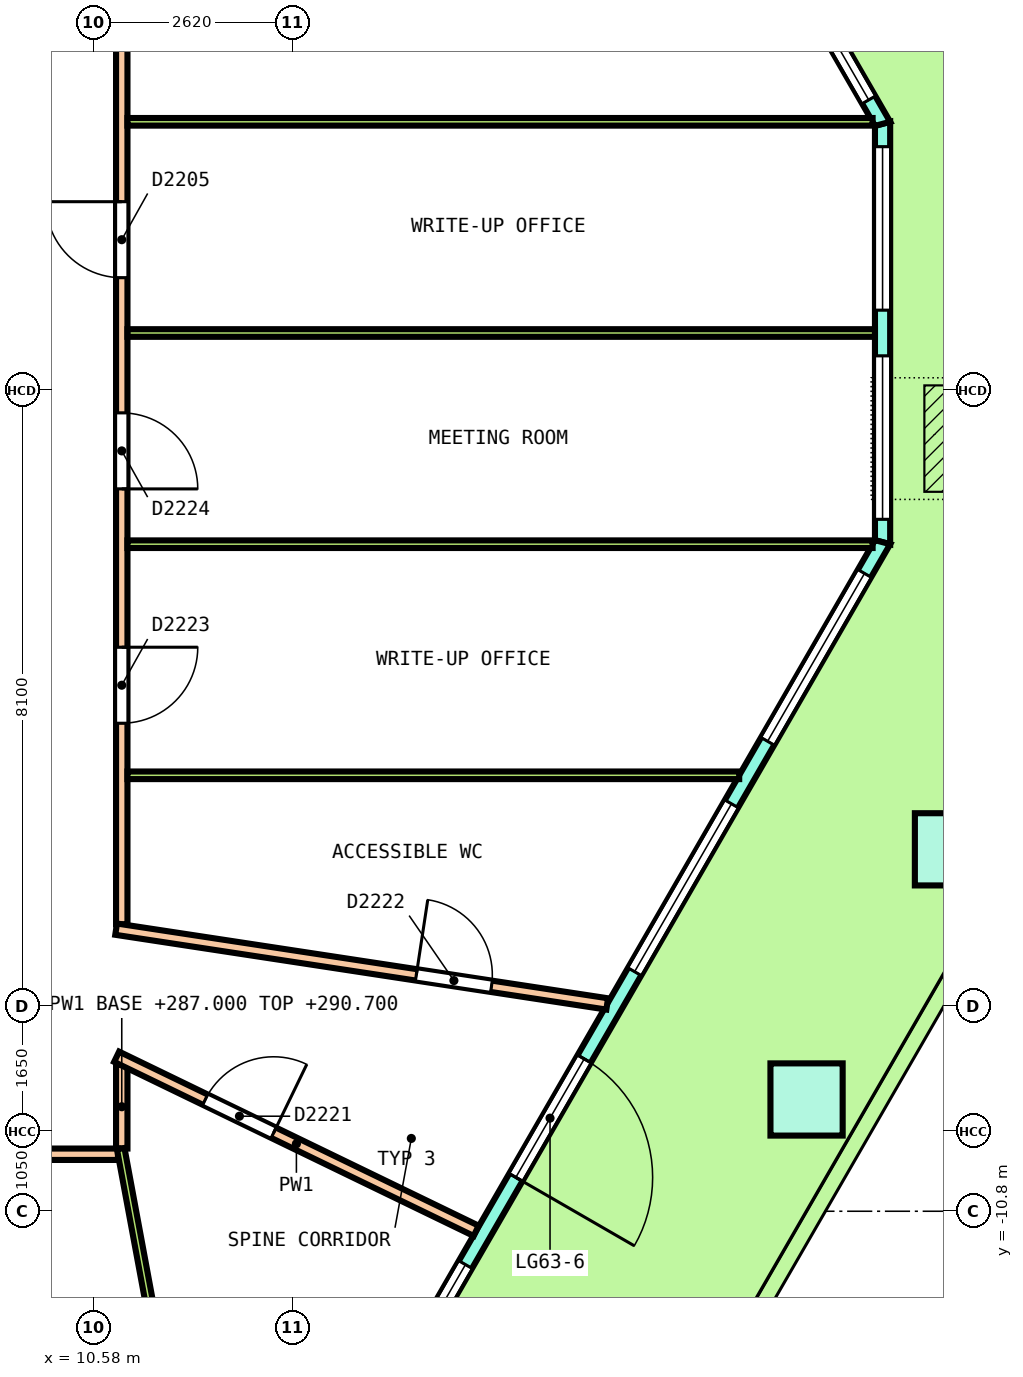
"""IFC4 building model, lengths in metres.
Left out: names, types, materials, properties, quantities, classifications, styles, units other than length and angle.
Written with IfcOpenShell. Run it as: python <this file> out.ifc"""

import sys

from ifc_helpers import new_model, si_unit, direction, frame, frame_2d, origin, origin_2d, place, context, subcontext, project, spatial, polyline, rectangle, outline, extrude, element, fill, save


model = new_model("IFC4")
c1 = context("Model", 3, precision=1e-05, world=origin(), true_north=direction((0.0, 1.0)))
c2 = subcontext(c1, "Body", "Model", "MODEL_VIEW")
j1 = project(units=[si_unit("LENGTHUNIT", "METRE"), si_unit("PLANEANGLEUNIT", "RADIAN")], contexts=[c1])
p1 = place(None, origin())
s1 = spatial("IfcSite", under=j1, at=p1, CompositionType="ELEMENT")
p2 = place(p1, origin())
s2 = spatial("IfcBuilding", under=s1, at=p2, CompositionType="ELEMENT")
p3 = place(p2, frame((0.0, 0.0, 287.0)))
s3 = spatial("IfcBuildingStorey", under=s2, at=p3, CompositionType="ELEMENT", Elevation=287.0)
p4 = place(p3, frame((19.959, -9.33, 0.0), z_axis=(0.003611945175, 0.00628746012, 0.999973710503), x_axis=(0.497890394796, 0.867209649664, -0.007251089524)))
e1 = element("IfcColumn", 1, at=p4, inside=s3, PredefinedType="COLUMN", context=c2, shape_type="SweptSolid", body=[
    extrude(rectangle(XDim=0.95, YDim=0.95, at=origin_2d()), origin(), (0.0, 0.0, 1.0), 3.65),
])
p5 = place(p3, frame((21.859, -6.039, 0.0), z_axis=(0.010833557325, 0.018858414602, 0.999763469144), x_axis=(0.498285075857, 0.866740432575, -0.0217486946)))
e2 = element("IfcColumn", 2, at=p5, inside=s3, PredefinedType="COLUMN", context=c2, shape_type="SweptSolid", body=[
    extrude(rectangle(XDim=0.95, YDim=0.95, at=origin_2d()), origin(), (0.0, 0.0, 1.0), 3.651),
])
p6 = place(p3, frame((20.959, -1.998, 0.0), z_axis=(0.0, 0.0, 1.0), x_axis=(0.0, 1.0, 0.0)))
e3 = element("IfcWall", 3, at=p6, inside=s3, PredefinedType="SOLIDWALL", context=c2, shape_type="SweptSolid", body=[
    extrude(outline(polyline([(-0.027, -0.1), (1.084, -0.1), (2.196, -0.1), (3.307, -0.1), (4.419, -0.1), (5.53, -0.1), (5.477, 0.1), (4.387, 0.1), (3.297, 0.1), (2.207, 0.1), (1.117, 0.1), (0.027, 0.1), (-0.027, -0.1)])), origin(), (0.0, 0.0, 1.0), 3.7),
])
p7 = place(p6, frame((0.301, 0.0, 0.1)))
e4 = element("IfcOpeningElement", 4, at=p7, cuts=e3, PredefinedType="OPENING", context=c2, shape_type="SweptSolid", body=[
    extrude(rectangle(XDim=2.15, YDim=2.75, at=frame_2d((1.075, 1.375))), frame((0.0, 0.11, 0.0), z_axis=(0.0, -1.0, 0.0), x_axis=(1.0, 0.0, 0.0)), (0.0, 0.0, 1.0), 0.22),
])
p8 = place(p6, frame((3.052, 0.0, 0.1)))
e5 = element("IfcOpeningElement", 5, at=p8, cuts=e3, PredefinedType="OPENING", context=c2, shape_type="SweptSolid", body=[
    extrude(rectangle(XDim=2.15, YDim=2.75, at=frame_2d((1.075, 1.375))), frame((0.0, 0.11, 0.0), z_axis=(0.0, -1.0, 0.0), x_axis=(1.0, 0.0, 0.0)), (0.0, 0.0, 1.0), 0.22),
])
p9 = place(p3, frame((20.959, 3.506, 0.0), z_axis=(0.0, 0.0, 1.0), x_axis=(-0.499998331335, 0.866026367187, 0.0)))
e6 = element("IfcWall", 6, at=p9, inside=s3, PredefinedType="SOLIDWALL", context=c2, shape_type="SweptSolid", body=[
    extrude(outline(polyline([(-0.027, -0.1), (1.04, -0.1), (2.107, -0.1), (3.175, -0.1), (4.242, -0.1), (5.309, -0.1), (6.376, -0.1), (7.443, -0.1), (8.51, -0.1), (9.578, -0.1), (10.645, -0.1), (11.712, -0.1), (12.779, -0.1), (13.846, -0.1), (14.914, -0.1), (14.86, 0.1), (13.8, 0.1), (12.741, 0.1), (11.681, 0.1), (10.622, 0.1), (9.562, 0.1), (8.503, 0.1), (7.443, 0.1), (6.384, 0.1), (5.324, 0.1), (4.265, 0.1), (3.205, 0.1), (2.146, 0.1), (1.086, 0.1), (0.027, 0.1), (-0.027, -0.1)])), origin(), (0.0, 0.0, 1.0), 3.7),
])
p10 = place(p9, frame((0.364, 0.0, 0.1)))
e7 = element("IfcOpeningElement", 7, at=p10, cuts=e6, PredefinedType="OPENING", context=c2, shape_type="SweptSolid", body=[
    extrude(rectangle(XDim=2.25, YDim=2.75, at=frame_2d((1.125, 1.375))), frame((0.0, 0.11, 0.0), z_axis=(0.0, -1.0, 0.0), x_axis=(1.0, 0.0, 0.0)), (0.0, 0.0, 1.0), 0.22),
])
p11 = place(p9, frame((3.341, 0.0, 0.1)))
e8 = element("IfcOpeningElement", 8, at=p11, cuts=e6, PredefinedType="OPENING", context=c2, shape_type="SweptSolid", body=[
    extrude(rectangle(XDim=2.25, YDim=2.75, at=frame_2d((1.125, 1.375))), frame((0.0, 0.11, 0.0), z_axis=(0.0, -1.0, 0.0), x_axis=(1.0, 0.0, 0.0)), (0.0, 0.0, 1.0), 0.22),
])
p12 = place(p9, frame((6.543, 0.0, 0.0)))
e9 = element("IfcOpeningElement", 9, at=p12, cuts=e6, PredefinedType="OPENING", context=c2, shape_type="SweptSolid", body=[
    extrude(rectangle(XDim=1.8, YDim=2.4, at=frame_2d((0.9, 1.2))), frame((0.0, 0.11, 0.0), z_axis=(0.0, -1.0, 0.0), x_axis=(1.0, 0.0, 0.0)), (0.0, 0.0, 1.0), 0.22),
])
p13 = place(p9, frame((6.543, 0.0, 2.55)))
e10 = element("IfcOpeningElement", 10, at=p13, cuts=e6, PredefinedType="OPENING", context=c2, shape_type="SweptSolid", body=[
    extrude(rectangle(XDim=1.8, YDim=0.3, at=frame_2d((0.9, 0.15))), frame((0.0, 0.11, 0.0), z_axis=(0.0, -1.0, 0.0), x_axis=(1.0, 0.0, 0.0)), (0.0, 0.0, 1.0), 0.22),
])
p14 = place(p9, frame((9.296, 0.0, 0.1)))
e11 = element("IfcOpeningElement", 11, at=p14, cuts=e6, PredefinedType="OPENING", context=c2, shape_type="SweptSolid", body=[
    extrude(rectangle(XDim=2.25, YDim=2.75, at=frame_2d((1.125, 1.375))), frame((0.0, 0.11, 0.0), z_axis=(0.0, -1.0, 0.0), x_axis=(1.0, 0.0, 0.0)), (0.0, 0.0, 1.0), 0.22),
])
p15 = place(p9, frame((12.273, 0.0, 0.1)))
e12 = element("IfcOpeningElement", 12, at=p15, cuts=e6, PredefinedType="OPENING", context=c2, shape_type="SweptSolid", body=[
    extrude(rectangle(XDim=2.25, YDim=2.75, at=frame_2d((1.125, 1.375))), frame((0.0, 0.11, 0.0), z_axis=(0.0, -1.0, 0.0), x_axis=(1.0, 0.0, 0.0)), (0.0, 0.0, 1.0), 0.22),
])
p16 = place(p3, frame((12.209, -17.153, 0.0), z_axis=(0.0, 0.0, 1.0), x_axis=(0.499999812077, 0.866025512282, 0.0)))
e13 = element("IfcWall", 13, at=p16, inside=s3, PredefinedType="SOLIDWALL", context=c2, shape_type="SweptSolid", body=[
    extrude(outline(polyline([(-0.027, -0.1), (1.006, -0.1), (2.038, -0.1), (3.071, -0.1), (4.103, -0.1), (5.136, -0.1), (6.168, -0.1), (7.201, -0.1), (8.233, -0.1), (9.266, -0.1), (10.299, -0.1), (11.331, -0.1), (12.364, -0.1), (13.396, -0.1), (14.429, -0.1), (15.461, -0.1), (16.494, -0.1), (17.526, -0.1), (17.473, 0.1), (16.447, 0.1), (15.42, 0.1), (14.394, 0.1), (13.368, 0.1), (12.342, 0.1), (11.315, 0.1), (10.289, 0.1), (9.263, 0.1), (8.237, 0.1), (7.21, 0.1), (6.184, 0.1), (5.158, 0.1), (4.132, 0.1), (3.105, 0.1), (2.079, 0.1), (1.053, 0.1), (0.027, 0.1), (-0.027, -0.1)])), origin(), (0.0, 0.0, 1.0), 3.7),
])
p17 = place(p16, frame((0.475, 0.0, 0.1)))
e14 = element("IfcOpeningElement", 14, at=p17, cuts=e13, PredefinedType="OPENING", context=c2, shape_type="SweptSolid", body=[
    extrude(rectangle(XDim=2.55, YDim=2.75, at=frame_2d((1.275, 1.375))), frame((0.0, 0.11, 0.0), z_axis=(0.0, -1.0, 0.0), x_axis=(1.0, 0.0, 0.0)), (0.0, 0.0, 1.0), 0.22),
])
p18 = place(p16, frame((3.975, 0.0, 0.1)))
e15 = element("IfcOpeningElement", 15, at=p18, cuts=e13, PredefinedType="OPENING", context=c2, shape_type="SweptSolid", body=[
    extrude(rectangle(XDim=2.55, YDim=2.75, at=frame_2d((1.275, 1.375))), frame((0.0, 0.11, 0.0), z_axis=(0.0, -1.0, 0.0), x_axis=(1.0, 0.0, 0.0)), (0.0, 0.0, 1.0), 0.22),
])
p19 = place(p16, frame((7.85, 0.0, 0.0)))
e16 = element("IfcOpeningElement", 16, at=p19, cuts=e13, PredefinedType="OPENING", context=c2, shape_type="SweptSolid", body=[
    extrude(rectangle(XDim=1.8, YDim=2.4, at=frame_2d((0.9, 1.2))), frame((0.0, 0.11, 0.0), z_axis=(0.0, -1.0, 0.0), x_axis=(1.0, 0.0, 0.0)), (0.0, 0.0, 1.0), 0.22),
])
p20 = place(p16, frame((7.85, 0.0, 2.55)))
e17 = element("IfcOpeningElement", 17, at=p20, cuts=e13, PredefinedType="OPENING", context=c2, shape_type="SweptSolid", body=[
    extrude(rectangle(XDim=1.8, YDim=0.3, at=frame_2d((0.9, 0.15))), frame((0.0, 0.11, 0.0), z_axis=(0.0, -1.0, 0.0), x_axis=(1.0, 0.0, 0.0)), (0.0, 0.0, 1.0), 0.22),
])
p21 = place(p16, frame((10.975, 0.0, 0.1)))
e18 = element("IfcOpeningElement", 18, at=p21, cuts=e13, PredefinedType="OPENING", context=c2, shape_type="SweptSolid", body=[
    extrude(rectangle(XDim=2.55, YDim=2.75, at=frame_2d((1.275, 1.375))), frame((0.0, 0.11, 0.0), z_axis=(0.0, -1.0, 0.0), x_axis=(1.0, 0.0, 0.0)), (0.0, 0.0, 1.0), 0.22),
])
p22 = place(p16, frame((14.475, 0.0, 0.1)))
e19 = element("IfcOpeningElement", 19, at=p22, cuts=e13, PredefinedType="OPENING", context=c2, shape_type="SweptSolid", body=[
    extrude(rectangle(XDim=2.55, YDim=2.75, at=frame_2d((1.275, 1.375))), frame((0.0, 0.11, 0.0), z_axis=(0.0, -1.0, 0.0), x_axis=(1.0, 0.0, 0.0)), (0.0, 0.0, 1.0), 0.22),
])
p23 = place(p3, frame((10.95, -9.975, 0.0), z_axis=(0.0, 0.0, 1.0), x_axis=(0.0, 1.0, 0.0)))
e20 = element("IfcWall", 20, at=p23, inside=s3, PredefinedType="PARTITIONING", context=c2, shape_type="SweptSolid", body=[
    extrude(rectangle(XDim=1.1, YDim=0.15, at=frame_2d((0.55, 0.0))), origin(), (0.0, 0.0, 1.0), 3.7),
])
p24 = place(p3, frame((10.95, -7.025, 0.0), z_axis=(0.0, 0.0, 1.0), x_axis=(0.0, 1.0, 0.0)))
e21 = element("IfcWall", 21, at=p24, inside=s3, PredefinedType="PARTITIONING", context=c2, shape_type="SweptSolid", body=[
    extrude(rectangle(XDim=17.0, YDim=0.15, at=frame_2d((8.5, 0.0))), origin(), (0.0, 0.0, 1.0), 2.9),
])
p25 = place(p24, frame((8.507, 0.0, 0.0)))
e22 = element("IfcOpeningElement", 22, at=p25, cuts=e21, PredefinedType="OPENING", context=c2, shape_type="SweptSolid", body=[
    extrude(rectangle(XDim=1.0, YDim=2.1, at=frame_2d((0.5, 1.05))), frame((0.0, 0.085, 0.0), z_axis=(0.0, -1.0, 0.0), x_axis=(1.0, 0.0, 0.0)), (0.0, 0.0, 1.0), 0.17),
])
p26 = place(p24, frame((12.524, 0.0, 0.0)))
e23 = element("IfcOpeningElement", 23, at=p26, cuts=e21, PredefinedType="OPENING", context=c2, shape_type="SweptSolid", body=[
    extrude(rectangle(XDim=1.2, YDim=2.1, at=frame_2d((0.6, 1.05))), frame((0.0, 0.085, 0.0), z_axis=(0.0, -1.0, 0.0), x_axis=(1.0, 0.0, 0.0)), (0.0, 0.0, 1.0), 0.17),
])
p27 = place(p24, frame((2.646, 0.0, 0.0)))
e24 = element("IfcOpeningElement", 24, at=p27, cuts=e21, PredefinedType="OPENING", context=c2, shape_type="SweptSolid", body=[
    extrude(rectangle(XDim=1.0, YDim=2.1, at=frame_2d((0.5, 1.05))), frame((0.0, 0.085, 0.0), z_axis=(0.0, -1.0, 0.0), x_axis=(1.0, 0.0, 0.0)), (0.0, 0.0, 1.0), 0.17),
])
p28 = place(p24, frame((5.728, 0.0, 0.0)))
e25 = element("IfcOpeningElement", 25, at=p28, cuts=e21, PredefinedType="OPENING", context=c2, shape_type="SweptSolid", body=[
    extrude(rectangle(XDim=1.0, YDim=2.1, at=frame_2d((0.5, 1.05))), frame((0.0, 0.085, 0.0), z_axis=(0.0, -1.0, 0.0), x_axis=(1.0, 0.0, 0.0)), (0.0, 0.0, 1.0), 0.17),
])
p29 = place(p3, frame((-10.9, -10.05, 0.0), z_axis=(0.0, 0.0, 1.0), x_axis=(1.0, 0.0, 0.0)))
e26 = element("IfcWall", 26, at=p29, inside=s3, PredefinedType="PARTITIONING", context=c2, shape_type="SweptSolid", body=[
    extrude(rectangle(XDim=21.8, YDim=0.15, at=frame_2d((10.9, 0.0))), origin(), (0.0, 0.0, 1.0), 2.9),
])
p30 = place(p29, frame((3.269, 0.0, 0.0)))
e27 = element("IfcOpeningElement", 27, at=p30, cuts=e26, PredefinedType="OPENING", context=c2, shape_type="SweptSolid", body=[
    extrude(rectangle(XDim=1.2, YDim=2.1, at=frame_2d((0.6, 1.05))), frame((0.0, 0.085, 0.0), z_axis=(0.0, -1.0, 0.0), x_axis=(1.0, 0.0, 0.0)), (0.0, 0.0, 1.0), 0.17),
])
p31 = place(p29, frame((12.216, 0.0, 0.0)))
e28 = element("IfcOpeningElement", 28, at=p31, cuts=e26, PredefinedType="OPENING", context=c2, shape_type="SweptSolid", body=[
    extrude(rectangle(XDim=1.0, YDim=2.1, at=frame_2d((0.5, 1.05))), frame((0.0, 0.085, 0.0), z_axis=(0.0, -1.0, 0.0), x_axis=(1.0, 0.0, 0.0)), (0.0, 0.0, 1.0), 0.17),
])
p32 = place(p29, frame((16.569, 0.0, 0.0)))
e29 = element("IfcOpeningElement", 29, at=p32, cuts=e26, PredefinedType="OPENING", context=c2, shape_type="SweptSolid", body=[
    extrude(rectangle(XDim=1.0, YDim=2.1, at=frame_2d((0.5, 1.05))), frame((0.0, 0.085, 0.0), z_axis=(0.0, -1.0, 0.0), x_axis=(1.0, 0.0, 0.0)), (0.0, 0.0, 1.0), 0.17),
])
p33 = place(p29, frame((18.897, 0.0, 0.0)))
e30 = element("IfcOpeningElement", 30, at=p33, cuts=e26, PredefinedType="OPENING", context=c2, shape_type="SweptSolid", body=[
    extrude(rectangle(XDim=1.0, YDim=2.1, at=frame_2d((0.5, 1.05))), frame((0.0, 0.085, 0.0), z_axis=(0.0, -1.0, 0.0), x_axis=(1.0, 0.0, 0.0)), (0.0, 0.0, 1.0), 0.17),
])
p34 = place(p3, frame((10.883, -8.767, 0.0), z_axis=(0.0, 0.0, 1.0), x_axis=(0.900031721008, -0.435824392593, 0.0)))
e31 = element("IfcWall", 31, at=p34, inside=s3, PredefinedType="PARTITIONING", context=c2, shape_type="SweptSolid", body=[
    extrude(rectangle(XDim=5.256, YDim=0.15, at=frame_2d((2.628, 0.0))), origin(), (0.0, 0.0, 1.0), 2.9),
])
p35 = place(p34, frame((1.295, 0.0, 0.0)))
e32 = element("IfcOpeningElement", 32, at=p35, cuts=e31, PredefinedType="OPENING", context=c2, shape_type="SweptSolid", body=[
    extrude(rectangle(XDim=1.0, YDim=2.1, at=frame_2d((0.5, 1.05))), frame((0.0, 0.085, 0.0), z_axis=(0.0, -1.0, 0.0), x_axis=(1.0, 0.0, 0.0)), (0.0, 0.0, 1.0), 0.17),
])
p36 = place(p3, frame((10.876, -7.089, 0.0), z_axis=(0.0, 0.0, 1.0), x_axis=(0.988601194897, -0.150557887364, 0.0)))
e33 = element("IfcWall", 33, at=p36, inside=s3, PredefinedType="PARTITIONING", context=c2, shape_type="SweptSolid", body=[
    extrude(rectangle(XDim=6.535, YDim=0.15, at=frame_2d((3.268, 0.0))), origin(), (0.0, 0.0, 1.0), 2.9),
])
p37 = place(p36, frame((3.995, 0.0, 0.0)))
e34 = element("IfcOpeningElement", 34, at=p37, cuts=e33, PredefinedType="OPENING", context=c2, shape_type="SweptSolid", body=[
    extrude(rectangle(XDim=1.0, YDim=2.1, at=frame_2d((0.5, 1.05))), frame((0.0, 0.085, 0.0), z_axis=(0.0, -1.0, 0.0), x_axis=(1.0, 0.0, 0.0)), (0.0, 0.0, 1.0), 0.17),
])
p38 = place(p3, frame((11.025, 3.533, 0.0), z_axis=(0.0, 0.0, 1.0), x_axis=(1.0, 0.0, 0.0)))
e35 = element("IfcWall", 35, at=p38, inside=s3, PredefinedType="PARTITIONING", context=c2, shape_type="SweptSolid", body=[
    extrude(rectangle(XDim=9.803, YDim=0.1, at=frame_2d((4.902, 0.0))), origin(), (0.0, 0.0, 1.0), 2.9),
])
p39 = place(p3, frame((11.025, 0.754, 0.0), z_axis=(0.0, 0.0, 1.0), x_axis=(1.0, 0.0, 0.0)))
e36 = element("IfcWall", 36, at=p39, inside=s3, PredefinedType="PARTITIONING", context=c2, shape_type="SweptSolid", body=[
    extrude(rectangle(XDim=9.834, YDim=0.1, at=frame_2d((4.917, 0.0))), origin(), (0.0, 0.0, 1.0), 2.9),
])
p40 = place(p3, frame((11.025, -2.024, 0.0), z_axis=(0.0, 0.0, 1.0), x_axis=(1.0, 0.0, 0.0)))
e37 = element("IfcWall", 37, at=p40, inside=s3, PredefinedType="PARTITIONING", context=c2, shape_type="SweptSolid", body=[
    extrude(rectangle(XDim=9.803, YDim=0.1, at=frame_2d((4.902, 0.0))), origin(), (0.0, 0.0, 1.0), 2.9),
])
p41 = place(p3, frame((11.025, -5.065, 0.0), z_axis=(0.0, 0.0, 1.0), x_axis=(1.0, 0.0, 0.0)))
e38 = element("IfcWall", 38, at=p41, inside=s3, PredefinedType="PARTITIONING", context=c2, shape_type="SweptSolid", body=[
    extrude(rectangle(XDim=8.048, YDim=0.1, at=frame_2d((4.024, 0.0))), origin(), (0.0, 0.0, 1.0), 2.9),
])
p42 = place(p3, frame((10.936, -9.976, 0.0), z_axis=(0.0, 0.0, 1.0), x_axis=(0.182615097653, -0.983184482236, 0.0)))
e39 = element("IfcWall", 39, at=p42, inside=s3, PredefinedType="PARTITIONING", context=c2, shape_type="SweptSolid", body=[
    extrude(rectangle(XDim=7.066, YDim=0.1, at=frame_2d((3.533, 0.0))), origin(), (0.0, 0.0, 1.0), 2.9),
])
p43 = place(p7, origin())
e40 = element("IfcWindow", 40, at=p43, inside=s3, PartitioningType="SINGLE_PANEL", PredefinedType="WINDOW", context=c2, shape_type="SweptSolid", body=[
    extrude(rectangle(XDim=2.15, YDim=2.75, at=frame_2d((1.075, 1.375))), frame((0.0, 0.03, 0.0), z_axis=(0.0, -1.0, 0.0), x_axis=(1.0, 0.0, 0.0)), (0.0, 0.0, 1.0), 0.06),
])
fill(e4, e40)
p44 = place(p8, origin())
e41 = element("IfcWindow", 41, at=p44, inside=s3, PartitioningType="SINGLE_PANEL", PredefinedType="WINDOW", context=c2, shape_type="SweptSolid", body=[
    extrude(rectangle(XDim=2.15, YDim=2.75, at=frame_2d((1.075, 1.375))), frame((0.0, 0.03, 0.0), z_axis=(0.0, -1.0, 0.0), x_axis=(1.0, 0.0, 0.0)), (0.0, 0.0, 1.0), 0.06),
])
fill(e5, e41)
p45 = place(p10, origin())
e42 = element("IfcWindow", 42, at=p45, inside=s3, PartitioningType="SINGLE_PANEL", PredefinedType="WINDOW", context=c2, shape_type="SweptSolid", body=[
    extrude(rectangle(XDim=2.25, YDim=2.75, at=frame_2d((1.125, 1.375))), frame((0.0, 0.03, 0.0), z_axis=(0.0, -1.0, 0.0), x_axis=(1.0, 0.0, 0.0)), (0.0, 0.0, 1.0), 0.06),
])
fill(e7, e42)
p46 = place(p18, origin())
e43 = element("IfcWindow", 43, at=p46, inside=s3, PartitioningType="SINGLE_PANEL", PredefinedType="WINDOW", context=c2, shape_type="SweptSolid", body=[
    extrude(rectangle(XDim=2.55, YDim=2.75, at=frame_2d((1.275, 1.375))), frame((0.0, 0.03, 0.0), z_axis=(0.0, -1.0, 0.0), x_axis=(1.0, 0.0, 0.0)), (0.0, 0.0, 1.0), 0.06),
])
fill(e15, e43)
p47 = place(p19, origin())
e44 = element("IfcDoor", 44, at=p47, inside=s3, OperationType="DOUBLE_DOOR_SINGLE_SWING", PredefinedType="DOOR", context=c2, shape_type="SweptSolid", body=[
    extrude(rectangle(XDim=1.8, YDim=2.4, at=frame_2d((0.9, 1.2))), frame((0.0, 0.025, 0.0), z_axis=(0.0, -1.0, 0.0), x_axis=(1.0, 0.0, 0.0)), (0.0, 0.0, 1.0), 0.05),
])
fill(e16, e44)
p48 = place(p20, origin())
e45 = element("IfcWindow", 45, at=p48, inside=s3, PartitioningType="SINGLE_PANEL", PredefinedType="WINDOW", context=c2, shape_type="SweptSolid", body=[
    extrude(rectangle(XDim=1.8, YDim=0.3, at=frame_2d((0.9, 0.15))), frame((0.0, 0.03, 0.0), z_axis=(0.0, -1.0, 0.0), x_axis=(1.0, 0.0, 0.0)), (0.0, 0.0, 1.0), 0.06),
])
fill(e17, e45)
p49 = place(p21, origin())
e46 = element("IfcWindow", 46, at=p49, inside=s3, PartitioningType="SINGLE_PANEL", PredefinedType="WINDOW", context=c2, shape_type="SweptSolid", body=[
    extrude(rectangle(XDim=2.55, YDim=2.75, at=frame_2d((1.275, 1.375))), frame((0.0, 0.03, 0.0), z_axis=(0.0, -1.0, 0.0), x_axis=(1.0, 0.0, 0.0)), (0.0, 0.0, 1.0), 0.06),
])
fill(e18, e46)
p50 = place(p22, origin())
e47 = element("IfcWindow", 47, at=p50, inside=s3, PartitioningType="SINGLE_PANEL", PredefinedType="WINDOW", context=c2, shape_type="SweptSolid", body=[
    extrude(rectangle(XDim=2.55, YDim=2.75, at=frame_2d((1.275, 1.375))), frame((0.0, 0.03, 0.0), z_axis=(0.0, -1.0, 0.0), x_axis=(1.0, 0.0, 0.0)), (0.0, 0.0, 1.0), 0.06),
])
fill(e19, e47)
p51 = place(p25, origin())
e48 = element("IfcDoor", 48, at=p51, inside=s3, OperationType="SINGLE_SWING_LEFT", PredefinedType="DOOR", context=c2, shape_type="SweptSolid", body=[
    extrude(rectangle(XDim=1.0, YDim=2.1, at=frame_2d((0.5, 1.05))), frame((0.0, 0.025, 0.0), z_axis=(0.0, -1.0, 0.0), x_axis=(1.0, 0.0, 0.0)), (0.0, 0.0, 1.0), 0.05),
])
fill(e22, e48)
p52 = place(p35, origin())
e49 = element("IfcDoor", 49, at=p52, inside=s3, OperationType="SINGLE_SWING_RIGHT", PredefinedType="DOOR", context=c2, shape_type="SweptSolid", body=[
    extrude(rectangle(XDim=1.0, YDim=2.1, at=frame_2d((0.5, 1.05))), frame((0.0, 0.025, 0.0), z_axis=(0.0, -1.0, 0.0), x_axis=(1.0, 0.0, 0.0)), (0.0, 0.0, 1.0), 0.05),
])
fill(e32, e49)
p53 = place(p37, origin())
e50 = element("IfcDoor", 50, at=p53, inside=s3, OperationType="SINGLE_SWING_LEFT", PredefinedType="DOOR", context=c2, shape_type="SweptSolid", body=[
    extrude(rectangle(XDim=1.0, YDim=2.1, at=frame_2d((0.5, 1.05))), frame((0.0, 0.025, 0.0), z_axis=(0.0, -1.0, 0.0), x_axis=(1.0, 0.0, 0.0)), (0.0, 0.0, 1.0), 0.05),
])
fill(e34, e50)
p54 = place(p27, origin())
e51 = element("IfcDoor", 51, at=p54, inside=s3, OperationType="SINGLE_SWING_RIGHT", PredefinedType="DOOR", context=c2, shape_type="SweptSolid", body=[
    extrude(rectangle(XDim=1.0, YDim=2.1, at=frame_2d((0.5, 1.05))), frame((0.0, 0.025, 0.0), z_axis=(0.0, -1.0, 0.0), x_axis=(1.0, 0.0, 0.0)), (0.0, 0.0, 1.0), 0.05),
])
fill(e24, e51)
p55 = place(p28, origin())
e52 = element("IfcDoor", 52, at=p55, inside=s3, OperationType="SINGLE_SWING_RIGHT", PredefinedType="DOOR", context=c2, shape_type="SweptSolid", body=[
    extrude(rectangle(XDim=1.0, YDim=2.1, at=frame_2d((0.5, 1.05))), frame((0.0, 0.025, 0.0), z_axis=(0.0, -1.0, 0.0), x_axis=(1.0, 0.0, 0.0)), (0.0, 0.0, 1.0), 0.05),
])
fill(e25, e52)
save(model, sys.argv[1])
